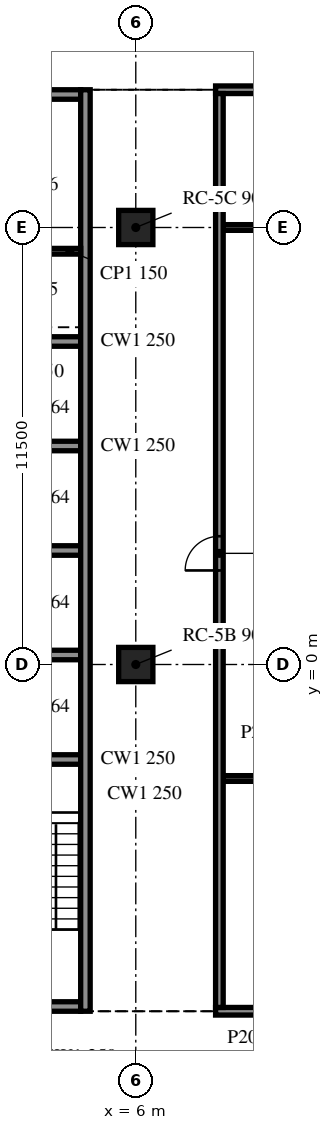
"""IFC4 building model, lengths in metres.
Left out: names, types, materials, properties, quantities, classifications, styles, units other than length and angle.
Written with IfcOpenShell. Run it as: python <this file> out.ifc"""

import sys

from ifc_helpers import new_model, si_unit, direction, frame, frame_2d, origin, origin_2d, place, context, subcontext, project, spatial, rectangle, extrude, element, fill, save


model = new_model("IFC4")
c1 = context("Model", 3, precision=1e-05, world=origin(), true_north=direction((0.0, 1.0)))
c2 = subcontext(c1, "Body", "Model", "MODEL_VIEW")
j1 = project(units=[si_unit("LENGTHUNIT", "METRE"), si_unit("PLANEANGLEUNIT", "RADIAN")], contexts=[c1])
p1 = place(None, origin())
s1 = spatial("IfcSite", under=j1, at=p1, CompositionType="ELEMENT")
p2 = place(p1, origin())
s2 = spatial("IfcBuilding", under=s1, at=p2, CompositionType="ELEMENT")
p3 = place(p2, frame((0.0, 0.0, 263.3)))
s3 = spatial("IfcBuildingStorey", under=s2, at=p3, CompositionType="ELEMENT", Elevation=263.3)
for number, where, z_axis, x_axis in (
    (1, (6.0, 0.0, -0.34), (0.0, 0.0, 1.0), (1.0, 0.0, 0.0)),
    (2, (6.0, 11.5, -0.34), (0.0, 0.0, 1.0), (1.0, 0.0, 0.0)),
):
    element("IfcColumn", number, at=place(p3, frame(where, z_axis=z_axis, x_axis=x_axis)), inside=s3, PredefinedType="COLUMN", context=c2, shape_type="SweptSolid", body=[
        extrude(rectangle(XDim=0.9, YDim=0.9, at=origin_2d()), origin(), (0.0, 0.0, 1.0), 3.8),
    ])
p4 = place(p3, frame((4.675, -9.125, 0.0), z_axis=(0.0, 0.0, 1.0), x_axis=(0.0, 1.0, 0.0)))
e3 = element("IfcWall", 3, at=p4, inside=s3, PredefinedType="SOLIDWALL", context=c2, shape_type="SweptSolid", body=[
    extrude(rectangle(XDim=24.25, YDim=0.25, at=frame_2d((12.125, 0.0))), origin(), (0.0, 0.0, 1.0), 3.46),
])
p5 = place(p3, frame((4.55, -9.0, 0.0), z_axis=(0.0, 0.0, 1.0), x_axis=(-1.0, 0.0, 0.0)))
e4 = element("IfcWall", 4, at=p5, inside=s3, PredefinedType="SOLIDWALL", context=c2, shape_type="SweptSolid", body=[
    extrude(rectangle(XDim=9.1, YDim=0.25, at=frame_2d((4.55, 0.0))), origin(), (0.0, 0.0, 1.0), 3.46),
])
p6 = place(p5, frame((3.65, 0.0, 0.0)))
e5 = element("IfcOpeningElement", 5, at=p6, cuts=e4, PredefinedType="OPENING", context=c2, shape_type="SweptSolid", body=[
    extrude(rectangle(XDim=1.8, YDim=2.1, at=frame_2d((0.9, 1.05))), frame((0.0, 0.135, 0.0), z_axis=(0.0, -1.0, 0.0), x_axis=(1.0, 0.0, 0.0)), (0.0, 0.0, 1.0), 0.27),
])
p7 = place(p3, frame((-4.55, 15.0, 0.0), z_axis=(0.0, 0.0, 1.0), x_axis=(1.0, 0.0, 0.0)))
e6 = element("IfcWall", 6, at=p7, inside=s3, PredefinedType="SOLIDWALL", context=c2, shape_type="SweptSolid", body=[
    extrude(rectangle(XDim=9.1, YDim=0.25, at=frame_2d((4.55, 0.0))), origin(), (0.0, 0.0, 1.0), 3.46),
])
p8 = place(p7, frame((3.65, 0.0, 0.0)))
e7 = element("IfcOpeningElement", 7, at=p8, cuts=e6, PredefinedType="OPENING", context=c2, shape_type="SweptSolid", body=[
    extrude(rectangle(XDim=1.8, YDim=2.1, at=frame_2d((0.9, 1.05))), frame((0.0, 0.135, 0.0), z_axis=(0.0, -1.0, 0.0), x_axis=(1.0, 0.0, 0.0)), (0.0, 0.0, 1.0), 0.27),
])
for number, where, z_axis, x_axis in (
    (8, (1.7, -2.5, 0.0), (0.0, 0.0, 1.0), (1.0, 0.0, 0.0)),
    (9, (1.7, 0.25, 0.0), (0.0, 0.0, 1.0), (1.0, 0.0, 0.0)),
    (10, (1.7, 3.0, 0.0), (0.0, 0.0, 1.0), (1.0, 0.0, 0.0)),
    (11, (1.7, 5.75, 0.0), (0.0, 0.0, 1.0), (1.0, 0.0, 0.0)),
    (12, (1.7, 8.5, 0.0), (0.0, 0.0, 1.0), (1.0, 0.0, 0.0)),
):
    element("IfcWall", number, at=place(p3, frame(where, z_axis=z_axis, x_axis=x_axis)), inside=s3, PredefinedType="SOLIDWALL", context=c2, shape_type="SweptSolid", body=[
        extrude(rectangle(XDim=2.85, YDim=0.25, at=frame_2d((1.425, 0.0))), origin(), (0.0, 0.0, 1.0), 3.46),
    ])
p9 = place(p3, frame((1.7, 10.875, 0.0), z_axis=(0.0, 0.0, 1.0), x_axis=(1.0, 0.0, 0.0)))
e13 = element("IfcWall", 13, at=p9, inside=s3, PredefinedType="PARTITIONING", context=c2, shape_type="SweptSolid", body=[
    extrude(rectangle(XDim=2.85, YDim=0.15, at=frame_2d((1.425, 0.0))), origin(), (0.0, 0.0, 1.0), 3.46),
])
p10 = place(p3, frame((8.1, -9.125, 0.0), z_axis=(0.0, 0.0, 1.0), x_axis=(1.0, 0.0, 0.0)))
e14 = element("IfcWall", 14, at=p10, inside=s3, PredefinedType="PARTITIONING", context=c2, shape_type="SweptSolid", body=[
    extrude(rectangle(XDim=7.7, YDim=0.2, at=frame_2d((3.85, 0.0))), origin(), (0.0, 0.0, 1.0), 3.46),
])
p11 = place(p10, frame((3.3, 0.0, 0.0)))
e15 = element("IfcOpeningElement", 15, at=p11, cuts=e14, PredefinedType="OPENING", context=c2, shape_type="SweptSolid", body=[
    extrude(rectangle(XDim=0.9, YDim=2.1, at=frame_2d((0.45, 1.05))), frame((0.0, 0.11, 0.0), z_axis=(0.0, -1.0, 0.0), x_axis=(1.0, 0.0, 0.0)), (0.0, 0.0, 1.0), 0.22),
])
for number, where, z_axis, x_axis in (
    (16, (8.3, -3.0, 0.0), (0.0, 0.0, 1.0), (1.0, 0.0, 0.0)),
    (17, (8.3, 11.5, 0.0), (0.0, 0.0, 1.0), (1.0, 0.0, 0.0)),
):
    element("IfcWall", number, at=place(p3, frame(where, z_axis=z_axis, x_axis=x_axis)), inside=s3, PredefinedType="PARTITIONING", context=c2, shape_type="SweptSolid", body=[
        extrude(rectangle(XDim=7.3, YDim=0.15, at=frame_2d((3.65, 0.0))), origin(), (0.0, 0.0, 1.0), 3.46),
    ])
p12 = place(p3, frame((8.1, 15.125, 0.0), z_axis=(0.0, 0.0, 1.0), x_axis=(1.0, 0.0, 0.0)))
e18 = element("IfcWall", 18, at=p12, inside=s3, PredefinedType="PARTITIONING", context=c2, shape_type="SweptSolid", body=[
    extrude(rectangle(XDim=7.7, YDim=0.2, at=frame_2d((3.85, 0.0))), origin(), (0.0, 0.0, 1.0), 3.46),
])
p13 = place(p12, frame((3.3, 0.0, 0.0)))
e19 = element("IfcOpeningElement", 19, at=p13, cuts=e18, PredefinedType="OPENING", context=c2, shape_type="SweptSolid", body=[
    extrude(rectangle(XDim=1.0, YDim=2.1, at=frame_2d((0.5, 1.05))), frame((0.0, 0.11, 0.0), z_axis=(0.0, -1.0, 0.0), x_axis=(1.0, 0.0, 0.0)), (0.0, 0.0, 1.0), 0.22),
])
p14 = place(p3, frame((8.2, -9.025, 0.0), z_axis=(0.0, 0.0, 1.0), x_axis=(0.0, 1.0, 0.0)))
e20 = element("IfcWall", 20, at=p14, inside=s3, PredefinedType="PARTITIONING", context=c2, shape_type="SweptSolid", body=[
    extrude(rectangle(XDim=24.05, YDim=0.2, at=frame_2d((12.025, 0.0))), origin(), (0.0, 0.0, 1.0), 3.46),
])
p15 = place(p14, frame((11.5, 0.0, 0.0)))
e21 = element("IfcOpeningElement", 21, at=p15, cuts=e20, PredefinedType="OPENING", context=c2, shape_type="SweptSolid", body=[
    extrude(rectangle(XDim=0.9, YDim=2.1, at=frame_2d((0.45, 1.05))), frame((0.0, 0.11, 0.0), z_axis=(0.0, -1.0, 0.0), x_axis=(1.0, 0.0, 0.0)), (0.0, 0.0, 1.0), 0.22),
])
p16 = place(p15, origin())
e22 = element("IfcDoor", 22, at=p16, inside=s3, OperationType="SINGLE_SWING_RIGHT", PredefinedType="DOOR", context=c2, shape_type="SweptSolid", body=[
    extrude(rectangle(XDim=0.9, YDim=2.1, at=frame_2d((0.45, 1.05))), frame((0.0, 0.025, 0.0), z_axis=(0.0, -1.0, 0.0), x_axis=(1.0, 0.0, 0.0)), (0.0, 0.0, 1.0), 0.05),
])
fill(e21, e22)
save(model, sys.argv[1])
